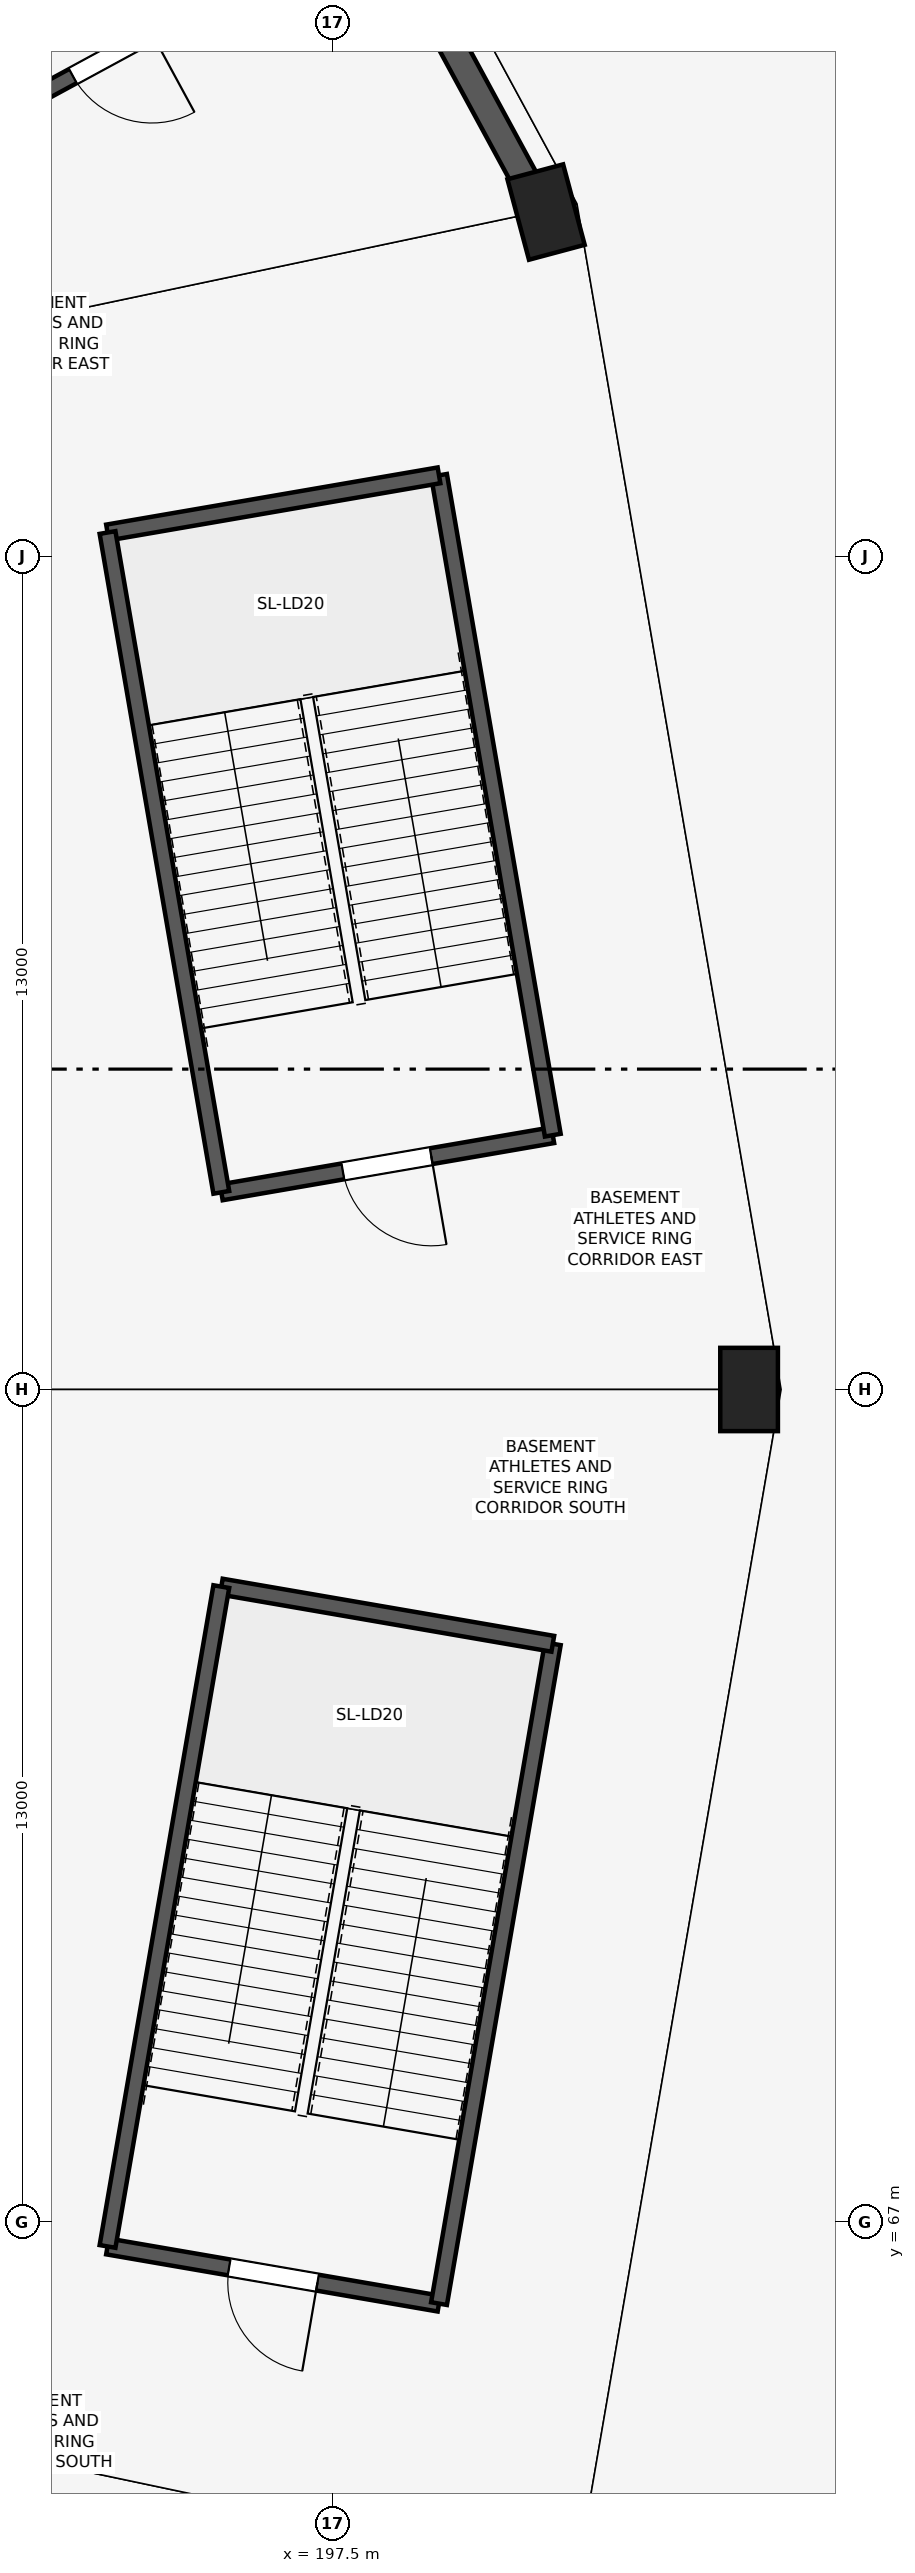
"""IFC4 building model, lengths in metres.
Left out: names, types, materials, properties, quantities, classifications, styles, units other than length and angle.
Written with IfcOpenShell. Run it as: python <this file> out.ifc"""

import sys

from ifc_helpers import new_model, si_unit, direction, frame, frame_2d, origin, origin_2d, place, context, subcontext, project, spatial, rectangle, extrude, element, fill, save


model = new_model("IFC4")
c1 = context("Model", 3, precision=1e-05, world=origin(), true_north=direction((0.0, 1.0)))
c2 = subcontext(c1, "Body", "Model", "MODEL_VIEW")
j1 = project(units=[si_unit("LENGTHUNIT", "METRE"), si_unit("PLANEANGLEUNIT", "RADIAN")], contexts=[c1])
p1 = place(None, origin())
s1 = spatial("IfcSite", under=j1, at=p1, CompositionType="ELEMENT")
p2 = place(p1, origin())
s2 = spatial("IfcBuilding", under=s1, at=p2, CompositionType="ELEMENT")
p3 = place(p2, frame((0.0, 0.0, -5.4)))
s3 = spatial("IfcBuildingStorey", under=s2, at=p3, CompositionType="ELEMENT", Elevation=-5.4)
for number, where, z_axis, x_axis in (
    (1, (204.0, 80.0, 0.0), (0.0, 0.0, 1.0), (1.0, 0.0, 0.0)),
    (2, (200.831, 98.376, 0.0), (0.0, 0.0, 1.0), (0.966, 0.259, 0.0)),
):
    element("IfcColumn", number, at=place(p3, frame(where, z_axis=z_axis, x_axis=x_axis)), inside=s3, PredefinedType="COLUMN", context=c2, shape_type="SweptSolid", body=[
        extrude(rectangle(XDim=0.9, YDim=1.3, at=origin_2d()), origin(), (0.0, 0.0, 1.0), 5.4),
    ])
p4 = place(p3, frame((200.783, 98.363, 0.0), z_axis=(0.0, 0.0, 1.0), x_axis=(-0.476947954388, 0.878931538178, 0.0)))
e3 = element("IfcWall", 3, at=p4, inside=s3, PredefinedType="SOLIDWALL", context=c2, shape_type="SweptSolid", body=[
    extrude(rectangle(XDim=19.469, YDim=0.42, at=frame_2d((9.734, 0.0))), origin(), (0.0, 0.0, 1.0), 4.45),
])
p5 = place(p3, frame((195.762, 83.077, 0.0), z_axis=(0.0, 0.0, 1.0), x_axis=(0.985457162135, 0.16992404655, 0.0)))
e4 = element("IfcWall", 4, at=p5, inside=s3, PredefinedType="SHEAR", context=c2, shape_type="SweptSolid", body=[
    extrude(rectangle(XDim=5.25, YDim=0.25, at=frame_2d((2.625, 0.0))), origin(), (0.0, 0.0, 1.0), 5.05),
])
p6 = place(p5, frame((1.925, 0.0, 0.0)))
e5 = element("IfcOpeningElement", 5, at=p6, cuts=e4, PredefinedType="OPENING", context=c2, shape_type="SweptSolid", body=[
    extrude(rectangle(XDim=1.4, YDim=2.2, at=frame_2d((0.7, 1.1))), frame((0.0, 0.135, 0.0), z_axis=(0.0, -1.0, 0.0), x_axis=(1.0, 0.0, 0.0)), (0.0, 0.0, 1.0), 0.27),
])
p7 = place(p3, frame((200.936, 83.969, 0.0), z_axis=(0.0, 0.0, 1.0), x_axis=(-0.169938992676, 0.985454584833, 0.0)))
e6 = element("IfcWall", 6, at=p7, inside=s3, PredefinedType="SHEAR", context=c2, shape_type="SweptSolid", body=[
    extrude(rectangle(XDim=10.45, YDim=0.25, at=frame_2d((5.225, 0.0))), origin(), (0.0, 0.0, 1.0), 5.05),
])
p8 = place(p3, frame((199.16, 94.267, 0.0), z_axis=(0.0, 0.0, 1.0), x_axis=(-0.985457162135, -0.16992404655, 0.0)))
e7 = element("IfcWall", 7, at=p8, inside=s3, PredefinedType="SHEAR", context=c2, shape_type="SweptSolid", body=[
    extrude(rectangle(XDim=5.25, YDim=0.25, at=frame_2d((2.625, 0.0))), origin(), (0.0, 0.0, 1.0), 5.05),
])
p9 = place(p3, frame((193.987, 93.375, 0.0), z_axis=(0.0, 0.0, 1.0), x_axis=(0.169938992676, -0.985454584833, 0.0)))
e8 = element("IfcWall", 8, at=p9, inside=s3, PredefinedType="SHEAR", context=c2, shape_type="SweptSolid", body=[
    extrude(rectangle(XDim=10.45, YDim=0.25, at=frame_2d((5.225, 0.0))), origin(), (0.0, 0.0, 1.0), 5.05),
])
p10 = place(p3, frame((191.754, 99.58, 0.0), z_axis=(0.0, 0.0, 1.0), x_axis=(0.878961487093, 0.47689275965, 0.0)))
e9 = element("IfcWall", 9, at=p10, inside=s3, PredefinedType="SHEAR", context=c2, shape_type="SweptSolid", body=[
    extrude(rectangle(XDim=5.25, YDim=0.25, at=frame_2d((2.625, 0.0))), origin(), (0.0, 0.0, 1.0), 5.05),
])
p11 = place(p10, frame((1.925, 0.0, 0.0)))
e10 = element("IfcOpeningElement", 10, at=p11, cuts=e9, PredefinedType="OPENING", context=c2, shape_type="SweptSolid", body=[
    extrude(rectangle(XDim=1.4, YDim=2.2, at=frame_2d((0.7, 1.1))), frame((0.0, 0.135, 0.0), z_axis=(0.0, -1.0, 0.0), x_axis=(1.0, 0.0, 0.0)), (0.0, 0.0, 1.0), 0.27),
])
p12 = place(p3, frame((193.987, 66.625, 0.0), z_axis=(0.0, 0.0, 1.0), x_axis=(0.985457162135, -0.16992404655, 0.0)))
e11 = element("IfcWall", 11, at=p12, inside=s3, PredefinedType="SHEAR", context=c2, shape_type="SweptSolid", body=[
    extrude(rectangle(XDim=5.25, YDim=0.25, at=frame_2d((2.625, 0.0))), origin(), (0.0, 0.0, 1.0), 5.05),
])
p13 = place(p12, frame((1.925, 0.0, 0.0)))
e12 = element("IfcOpeningElement", 12, at=p13, cuts=e11, PredefinedType="OPENING", context=c2, shape_type="SweptSolid", body=[
    extrude(rectangle(XDim=1.4, YDim=2.2, at=frame_2d((0.7, 1.1))), frame((0.0, 0.135, 0.0), z_axis=(0.0, -1.0, 0.0), x_axis=(1.0, 0.0, 0.0)), (0.0, 0.0, 1.0), 0.27),
])
p14 = place(p3, frame((199.16, 65.733, 0.0), z_axis=(0.0, 0.0, 1.0), x_axis=(0.169938992676, 0.985454584833, 0.0)))
e13 = element("IfcWall", 13, at=p14, inside=s3, PredefinedType="SHEAR", context=c2, shape_type="SweptSolid", body=[
    extrude(rectangle(XDim=10.45, YDim=0.25, at=frame_2d((5.225, 0.0))), origin(), (0.0, 0.0, 1.0), 5.05),
])
p15 = place(p3, frame((200.936, 76.031, 0.0), z_axis=(0.0, 0.0, 1.0), x_axis=(-0.985458504796, 0.169916259745, 0.0)))
e14 = element("IfcWall", 14, at=p15, inside=s3, PredefinedType="SHEAR", context=c2, shape_type="SweptSolid", body=[
    extrude(rectangle(XDim=5.25, YDim=0.25, at=frame_2d((2.625, 0.0))), origin(), (0.0, 0.0, 1.0), 5.05),
])
p16 = place(p3, frame((195.762, 76.923, 0.0), z_axis=(0.0, 0.0, 1.0), x_axis=(-0.16991630471, -0.985458497043, 0.0)))
e15 = element("IfcWall", 15, at=p16, inside=s3, PredefinedType="SHEAR", context=c2, shape_type="SweptSolid", body=[
    extrude(rectangle(XDim=10.45, YDim=0.25, at=frame_2d((5.225, 0.0))), origin(), (0.0, 0.0, 1.0), 5.05),
])
p17 = place(p6, frame((1.4, 0.0, 0.0), z_axis=(0.0, 0.0, 1.0), x_axis=(-1.0, 0.0, 0.0)))
e16 = element("IfcDoor", 16, at=p17, inside=s3, OperationType="SINGLE_SWING_LEFT", PredefinedType="DOOR", context=c2, shape_type="SweptSolid", body=[
    extrude(rectangle(XDim=1.4, YDim=2.2, at=frame_2d((0.7, 1.1))), frame((0.0, 0.025, 0.0), z_axis=(0.0, -1.0, 0.0), x_axis=(1.0, 0.0, 0.0)), (0.0, 0.0, 1.0), 0.05),
])
fill(e5, e16)
p18 = place(p11, frame((1.4, 0.0, 0.0), z_axis=(0.0, 0.0, 1.0), x_axis=(-1.0, 0.0, 0.0)))
e17 = element("IfcDoor", 17, at=p18, inside=s3, OperationType="SINGLE_SWING_LEFT", PredefinedType="DOOR", context=c2, shape_type="SweptSolid", body=[
    extrude(rectangle(XDim=1.4, YDim=2.2, at=frame_2d((0.7, 1.1))), frame((0.0, 0.025, 0.0), z_axis=(0.0, -1.0, 0.0), x_axis=(1.0, 0.0, 0.0)), (0.0, 0.0, 1.0), 0.05),
])
fill(e10, e17)
p19 = place(p13, frame((1.4, 0.0, 0.0), z_axis=(0.0, 0.0, 1.0), x_axis=(-1.0, 0.0, 0.0)))
e18 = element("IfcDoor", 18, at=p19, inside=s3, OperationType="SINGLE_SWING_LEFT", PredefinedType="DOOR", context=c2, shape_type="SweptSolid", body=[
    extrude(rectangle(XDim=1.4, YDim=2.2, at=frame_2d((0.7, 1.1))), frame((0.0, 0.025, 0.0), z_axis=(0.0, -1.0, 0.0), x_axis=(1.0, 0.0, 0.0)), (0.0, 0.0, 1.0), 0.05),
])
fill(e12, e18)
save(model, sys.argv[1])
